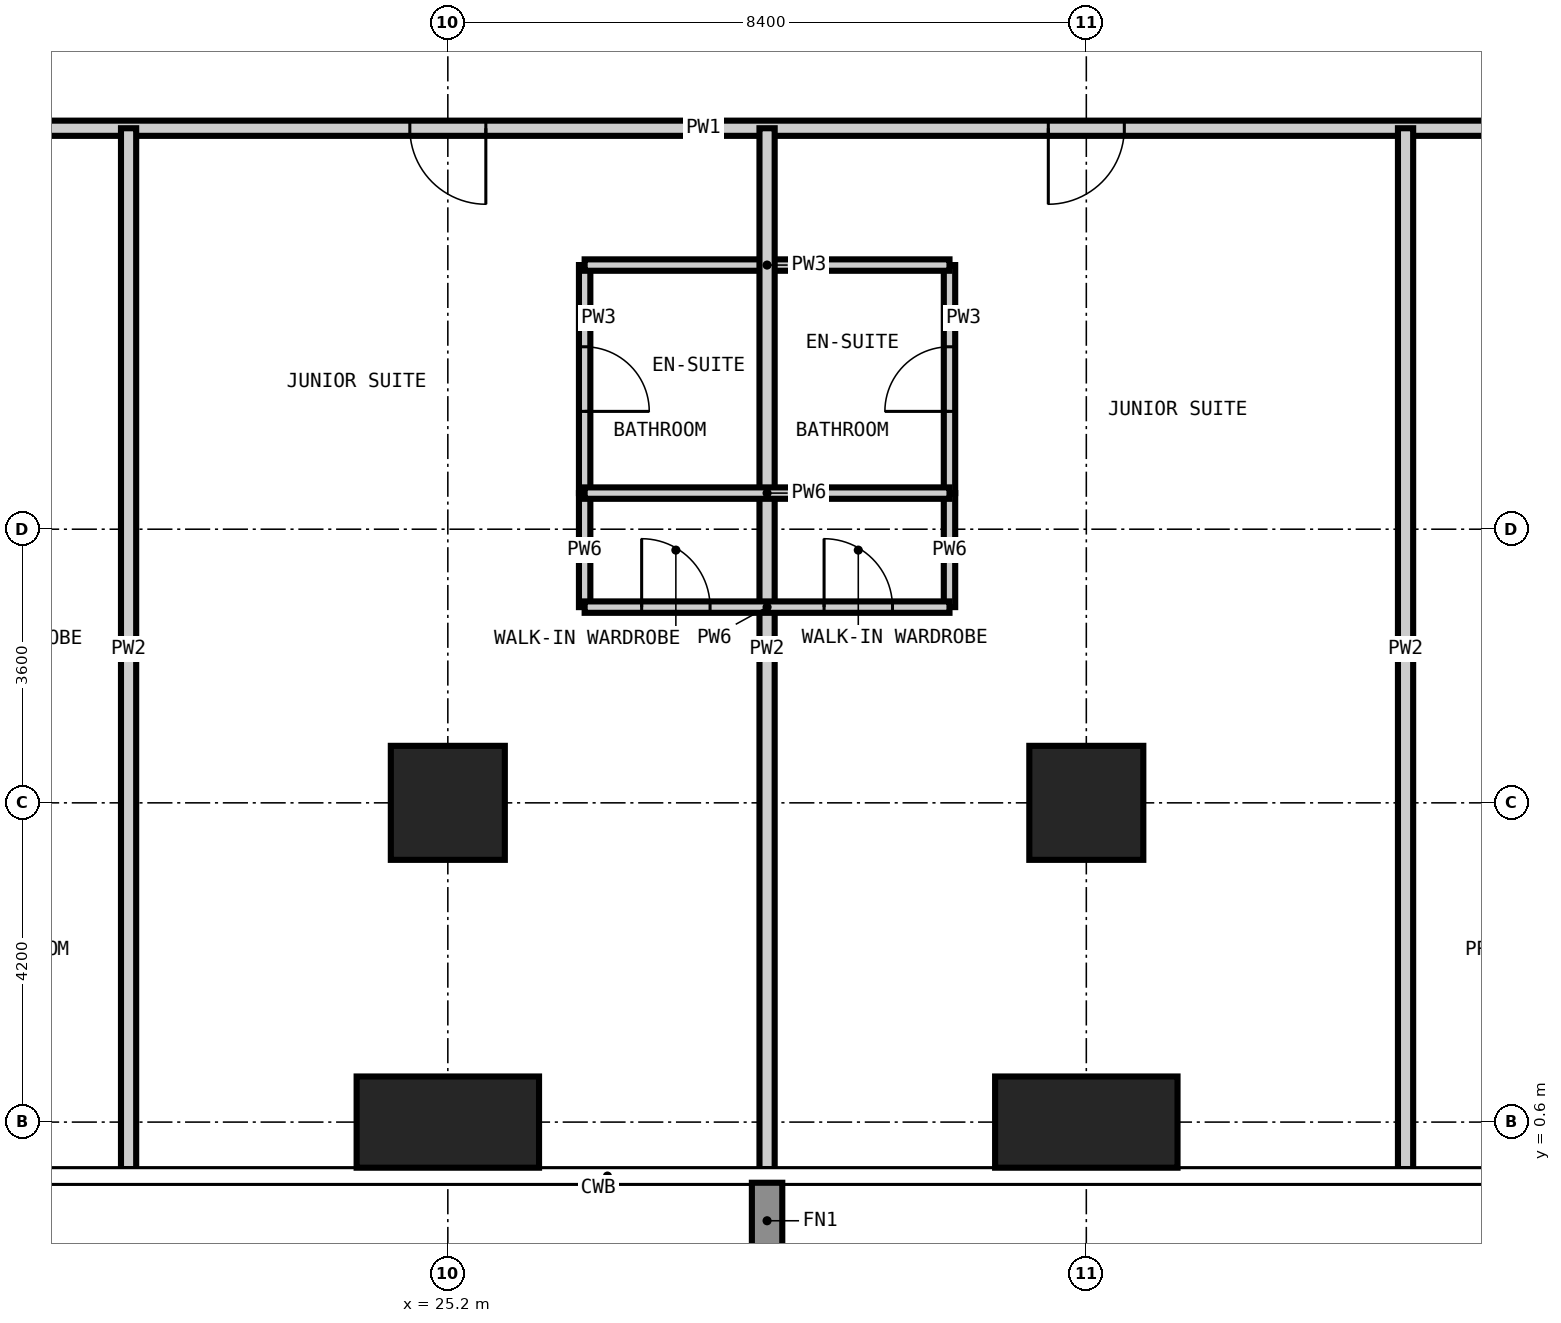
"""IFC4 building model, lengths in metres.
Left out: names, types, materials, properties, quantities, classifications, styles, units other than length and angle.
Written with IfcOpenShell. Run it as: python <this file> out.ifc"""

import sys

from ifc_helpers import new_model, si_unit, direction, frame, frame_2d, origin, origin_2d, place, context, subcontext, project, spatial, rectangle, extrude, element, fill, save


model = new_model("IFC4")
c1 = context("Model", 3, precision=1e-05, world=origin(), true_north=direction((0.0, 1.0)))
c2 = subcontext(c1, "Body", "Model", "MODEL_VIEW")
j1 = project(units=[si_unit("LENGTHUNIT", "METRE"), si_unit("PLANEANGLEUNIT", "RADIAN")], contexts=[c1])
p1 = place(None, origin())
s1 = spatial("IfcSite", under=j1, at=p1, CompositionType="ELEMENT")
p2 = place(p1, origin())
s2 = spatial("IfcBuilding", under=s1, at=p2, CompositionType="ELEMENT")
p3 = place(p2, frame((0.0, 0.0, 122.4)))
s3 = spatial("IfcBuildingStorey", under=s2, at=p3, CompositionType="ELEMENT", Elevation=122.4)
p4 = place(p3, frame((25.2, 0.6, -0.35), z_axis=(0.0, 0.0, 1.0), x_axis=(1.0, 0.0, 0.0)))
e1 = element("IfcColumn", 1, at=p4, inside=s3, PredefinedType="COLUMN", context=c2, shape_type="SweptSolid", body=[
    extrude(rectangle(XDim=2.4, YDim=1.2, at=origin_2d()), origin(), (0.0, 0.0, 1.0), 3.6),
])
p5 = place(p3, frame((25.2, 4.8, -0.35), z_axis=(0.0, 0.0, 1.0), x_axis=(1.0, 0.0, 0.0)))
e2 = element("IfcColumn", 2, at=p5, inside=s3, PredefinedType="COLUMN", context=c2, shape_type="SweptSolid", body=[
    extrude(rectangle(XDim=1.5, YDim=1.5, at=origin_2d()), origin(), (0.0, 0.0, 1.0), 3.6),
])
p6 = place(p3, frame((33.6, 0.6, -0.35), z_axis=(0.0, 0.0, 1.0), x_axis=(1.0, 0.0, 0.0)))
e3 = element("IfcColumn", 3, at=p6, inside=s3, PredefinedType="COLUMN", context=c2, shape_type="SweptSolid", body=[
    extrude(rectangle(XDim=2.4, YDim=1.2, at=origin_2d()), origin(), (0.0, 0.0, 1.0), 3.6),
])
p7 = place(p3, frame((33.6, 4.8, -0.35), z_axis=(0.0, 0.0, 1.0), x_axis=(1.0, 0.0, 0.0)))
e4 = element("IfcColumn", 4, at=p7, inside=s3, PredefinedType="COLUMN", context=c2, shape_type="SweptSolid", body=[
    extrude(rectangle(XDim=1.5, YDim=1.5, at=origin_2d()), origin(), (0.0, 0.0, 1.0), 3.6),
])
p8 = place(p3, frame((27.0, 8.875, 0.0), z_axis=(0.0, 0.0, 1.0), x_axis=(0.0, 1.0, 0.0)))
e5 = element("IfcWall", 5, at=p8, inside=s3, PredefinedType="PARTITIONING", context=c2, shape_type="SweptSolid", body=[
    extrude(rectangle(XDim=3.0, YDim=0.15, at=frame_2d((1.5, 0.0))), origin(), (0.0, 0.0, 1.0), 3.25),
])
p9 = place(p8, frame((1.075, 0.0, 0.0)))
e6 = element("IfcOpeningElement", 6, at=p9, cuts=e5, PredefinedType="OPENING", context=c2, shape_type="SweptSolid", body=[
    extrude(rectangle(XDim=0.85, YDim=2.1, at=frame_2d((0.425, 1.05))), frame((0.0, 0.085, 0.0), z_axis=(0.0, -1.0, 0.0), x_axis=(1.0, 0.0, 0.0)), (0.0, 0.0, 1.0), 0.17),
])
p10 = place(p3, frame((31.8, 8.875, 0.0), z_axis=(0.0, 0.0, 1.0), x_axis=(0.0, 1.0, 0.0)))
e7 = element("IfcWall", 7, at=p10, inside=s3, PredefinedType="PARTITIONING", context=c2, shape_type="SweptSolid", body=[
    extrude(rectangle(XDim=3.0, YDim=0.15, at=frame_2d((1.5, 0.0))), origin(), (0.0, 0.0, 1.0), 3.25),
])
p11 = place(p10, frame((1.075, 0.0, 0.0)))
e8 = element("IfcOpeningElement", 8, at=p11, cuts=e7, PredefinedType="OPENING", context=c2, shape_type="SweptSolid", body=[
    extrude(rectangle(XDim=0.85, YDim=2.1, at=frame_2d((0.425, 1.05))), frame((0.0, 0.085, 0.0), z_axis=(0.0, -1.0, 0.0), x_axis=(1.0, 0.0, 0.0)), (0.0, 0.0, 1.0), 0.17),
])
p12 = place(p3, frame((27.0, 11.875, 0.0), z_axis=(0.0, 0.0, 1.0), x_axis=(1.0, 0.0, 0.0)))
e9 = element("IfcWall", 9, at=p12, inside=s3, PredefinedType="PARTITIONING", context=c2, shape_type="SweptSolid", body=[
    extrude(rectangle(XDim=4.8, YDim=0.15, at=frame_2d((2.4, 0.0))), origin(), (0.0, 0.0, 1.0), 3.25),
])
p13 = place(p3, frame((44.525, 13.675, 0.0), z_axis=(0.0, 0.0, 1.0), x_axis=(-1.0, 0.0, 0.0)))
e10 = element("IfcWall", 10, at=p13, inside=s3, PredefinedType="PARTITIONING", context=c2, shape_type="SweptSolid", body=[
    extrude(rectangle(XDim=31.925, YDim=0.2, at=frame_2d((15.962, 0.0))), origin(), (0.0, 0.0, 1.0), 3.25),
])
p14 = place(p13, frame((25.125, 0.0, 0.0)))
e11 = element("IfcOpeningElement", 11, at=p14, cuts=e10, PredefinedType="OPENING", context=c2, shape_type="SweptSolid", body=[
    extrude(rectangle(XDim=1.0, YDim=2.2, at=frame_2d((0.5, 1.1))), frame((0.0, 0.11, 0.0), z_axis=(0.0, -1.0, 0.0), x_axis=(1.0, 0.0, 0.0)), (0.0, 0.0, 1.0), 0.22),
])
p15 = place(p13, frame((18.825, 0.0, 0.0)))
e12 = element("IfcOpeningElement", 12, at=p15, cuts=e10, PredefinedType="OPENING", context=c2, shape_type="SweptSolid", body=[
    extrude(rectangle(XDim=1.0, YDim=2.2, at=frame_2d((0.5, 1.1))), frame((0.0, 0.11, 0.0), z_axis=(0.0, -1.0, 0.0), x_axis=(1.0, 0.0, 0.0)), (0.0, 0.0, 1.0), 0.22),
])
p16 = place(p13, frame((10.425, 0.0, 0.0)))
e13 = element("IfcOpeningElement", 13, at=p16, cuts=e10, PredefinedType="OPENING", context=c2, shape_type="SweptSolid", body=[
    extrude(rectangle(XDim=1.0, YDim=2.2, at=frame_2d((0.5, 1.1))), frame((0.0, 0.11, 0.0), z_axis=(0.0, -1.0, 0.0), x_axis=(1.0, 0.0, 0.0)), (0.0, 0.0, 1.0), 0.22),
])
p17 = place(p13, frame((4.125, 0.0, 0.0)))
e14 = element("IfcOpeningElement", 14, at=p17, cuts=e10, PredefinedType="OPENING", context=c2, shape_type="SweptSolid", body=[
    extrude(rectangle(XDim=1.0, YDim=2.2, at=frame_2d((0.5, 1.1))), frame((0.0, 0.11, 0.0), z_axis=(0.0, -1.0, 0.0), x_axis=(1.0, 0.0, 0.0)), (0.0, 0.0, 1.0), 0.22),
])
for number, where, z_axis, x_axis in (
    (15, (21.0, -0.018, 0.0), (0.0, 0.0, 1.0), (0.0, 1.0, 0.0)),
    (16, (29.4, -0.018, 0.0), (0.0, 0.0, 1.0), (0.0, 1.0, 0.0)),
    (17, (37.8, -0.018, 0.0), (0.0, 0.0, 1.0), (0.0, 1.0, 0.0)),
):
    element("IfcWall", number, at=place(p3, frame(where, z_axis=z_axis, x_axis=x_axis)), inside=s3, PredefinedType="PARTITIONING", context=c2, shape_type="SweptSolid", body=[
        extrude(rectangle(XDim=13.693, YDim=0.2, at=frame_2d((6.847, 0.0))), origin(), (0.0, 0.0, 1.0), 3.25),
    ])
for number, where, z_axis, x_axis in (
    (18, (27.0, 7.375, 0.0), (0.0, 0.0, 1.0), (0.0, 1.0, 0.0)),
    (19, (31.8, 7.375, 0.0), (0.0, 0.0, 1.0), (0.0, 1.0, 0.0)),
):
    element("IfcWall", number, at=place(p3, frame(where, z_axis=z_axis, x_axis=x_axis)), inside=s3, PredefinedType="PARTITIONING", context=c2, shape_type="SweptSolid", body=[
        extrude(rectangle(XDim=1.5, YDim=0.15, at=frame_2d((0.75, 0.0))), origin(), (0.0, 0.0, 1.0), 3.25),
    ])
p18 = place(p3, frame((27.0, 7.375, 0.0), z_axis=(0.0, 0.0, 1.0), x_axis=(1.0, 0.0, 0.0)))
e20 = element("IfcWall", 20, at=p18, inside=s3, PredefinedType="PARTITIONING", context=c2, shape_type="SweptSolid", body=[
    extrude(rectangle(XDim=4.8, YDim=0.15, at=frame_2d((2.4, 0.0))), origin(), (0.0, 0.0, 1.0), 3.25),
])
p19 = place(p18, frame((0.75, 0.0, 0.0)))
e21 = element("IfcOpeningElement", 21, at=p19, cuts=e20, PredefinedType="OPENING", context=c2, shape_type="SweptSolid", body=[
    extrude(rectangle(XDim=0.9, YDim=2.1, at=frame_2d((0.45, 1.05))), frame((0.0, 0.085, 0.0), z_axis=(0.0, -1.0, 0.0), x_axis=(1.0, 0.0, 0.0)), (0.0, 0.0, 1.0), 0.17),
])
p20 = place(p18, frame((3.15, 0.0, 0.0)))
e22 = element("IfcOpeningElement", 22, at=p20, cuts=e20, PredefinedType="OPENING", context=c2, shape_type="SweptSolid", body=[
    extrude(rectangle(XDim=0.9, YDim=2.1, at=frame_2d((0.45, 1.05))), frame((0.0, 0.085, 0.0), z_axis=(0.0, -1.0, 0.0), x_axis=(1.0, 0.0, 0.0)), (0.0, 0.0, 1.0), 0.17),
])
p21 = place(p3, frame((27.0, 8.875, 0.0), z_axis=(0.0, 0.0, 1.0), x_axis=(1.0, 0.0, 0.0)))
e23 = element("IfcWall", 23, at=p21, inside=s3, PredefinedType="PARTITIONING", context=c2, shape_type="SweptSolid", body=[
    extrude(rectangle(XDim=4.8, YDim=0.15, at=frame_2d((2.4, 0.0))), origin(), (0.0, 0.0, 1.0), 3.25),
])
p22 = place(p15, origin())
e24 = element("IfcDoor", 24, at=p22, inside=s3, OperationType="SINGLE_SWING_LEFT", PredefinedType="DOOR", context=c2, shape_type="SweptSolid", body=[
    extrude(rectangle(XDim=1.0, YDim=2.2, at=frame_2d((0.5, 1.1))), frame((0.0, 0.025, 0.0), z_axis=(0.0, -1.0, 0.0), x_axis=(1.0, 0.0, 0.0)), (0.0, 0.0, 1.0), 0.05),
])
fill(e12, e24)
p23 = place(p9, frame((0.85, 0.0, 0.0), z_axis=(0.0, 0.0, 1.0), x_axis=(-1.0, 0.0, 0.0)))
e25 = element("IfcDoor", 25, at=p23, inside=s3, OperationType="SINGLE_SWING_RIGHT", PredefinedType="DOOR", context=c2, shape_type="SweptSolid", body=[
    extrude(rectangle(XDim=0.85, YDim=2.1, at=frame_2d((0.425, 1.05))), frame((0.0, 0.025, 0.0), z_axis=(0.0, -1.0, 0.0), x_axis=(1.0, 0.0, 0.0)), (0.0, 0.0, 1.0), 0.05),
])
fill(e6, e25)
p24 = place(p19, origin())
e26 = element("IfcDoor", 26, at=p24, inside=s3, OperationType="SINGLE_SWING_LEFT", PredefinedType="DOOR", context=c2, shape_type="SweptSolid", body=[
    extrude(rectangle(XDim=0.9, YDim=2.1, at=frame_2d((0.45, 1.05))), frame((0.0, 0.025, 0.0), z_axis=(0.0, -1.0, 0.0), x_axis=(1.0, 0.0, 0.0)), (0.0, 0.0, 1.0), 0.05),
])
fill(e21, e26)
p25 = place(p16, origin())
e27 = element("IfcDoor", 27, at=p25, inside=s3, OperationType="SINGLE_SWING_RIGHT", PredefinedType="DOOR", context=c2, shape_type="SweptSolid", body=[
    extrude(rectangle(XDim=1.0, YDim=2.2, at=frame_2d((0.5, 1.1))), frame((0.0, 0.025, 0.0), z_axis=(0.0, -1.0, 0.0), x_axis=(1.0, 0.0, 0.0)), (0.0, 0.0, 1.0), 0.05),
])
fill(e13, e27)
p26 = place(p11, origin())
e28 = element("IfcDoor", 28, at=p26, inside=s3, OperationType="SINGLE_SWING_LEFT", PredefinedType="DOOR", context=c2, shape_type="SweptSolid", body=[
    extrude(rectangle(XDim=0.85, YDim=2.1, at=frame_2d((0.425, 1.05))), frame((0.0, 0.025, 0.0), z_axis=(0.0, -1.0, 0.0), x_axis=(1.0, 0.0, 0.0)), (0.0, 0.0, 1.0), 0.05),
])
fill(e8, e28)
p27 = place(p20, origin())
e29 = element("IfcDoor", 29, at=p27, inside=s3, OperationType="SINGLE_SWING_LEFT", PredefinedType="DOOR", context=c2, shape_type="SweptSolid", body=[
    extrude(rectangle(XDim=0.9, YDim=2.1, at=frame_2d((0.45, 1.05))), frame((0.0, 0.025, 0.0), z_axis=(0.0, -1.0, 0.0), x_axis=(1.0, 0.0, 0.0)), (0.0, 0.0, 1.0), 0.05),
])
fill(e22, e29)
save(model, sys.argv[1])
